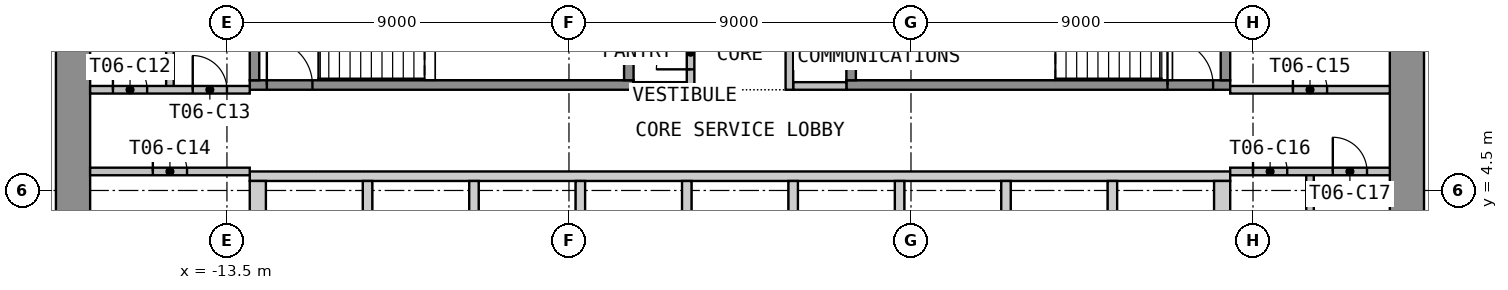
"""IFC4 building model, lengths in metres.
Left out: names, types, materials, properties, quantities, classifications, styles, units other than length and angle.
Written with IfcOpenShell. Run it as: python <this file> out.ifc"""

import sys

from ifc_helpers import new_model, si_unit, direction, frame, frame_2d, origin, place, context, subcontext, project, spatial, polyline, rectangle, outline, extrude, element, fill, save


model = new_model("IFC4")
c1 = context("Model", 3, precision=1e-05, world=origin(), true_north=direction((0.0, 1.0)))
c2 = subcontext(c1, "Body", "Model", "MODEL_VIEW")
j1 = project(units=[si_unit("LENGTHUNIT", "METRE"), si_unit("PLANEANGLEUNIT", "RADIAN")], contexts=[c1])
p1 = place(None, origin())
s1 = spatial("IfcSite", under=j1, at=p1, CompositionType="ELEMENT")
p2 = place(p1, origin())
s2 = spatial("IfcBuilding", under=s1, at=p2, CompositionType="ELEMENT")
p3 = place(p2, frame((0.0, 0.0, 93.0)))
s3 = spatial("IfcBuildingStorey", under=s2, at=p3, CompositionType="ELEMENT", Elevation=93.0)
p4 = place(p3, frame((-17.55, -12.6, 0.0), z_axis=(0.0, 0.0, 1.0), x_axis=(0.0, 1.0, 0.0)))
e1 = element("IfcWall", 1, at=p4, inside=s3, PredefinedType="SHEAR", context=c2, shape_type="SweptSolid", body=[
    extrude(rectangle(XDim=25.2, YDim=0.9, at=frame_2d((12.6, 0.0))), origin(), (0.0, 0.0, 1.0), 3.525),
])
p5 = place(p4, frame((11.4, 0.0, 0.0)))
e2 = element("IfcOpeningElement", 2, at=p5, cuts=e1, PredefinedType="OPENING", context=c2, shape_type="SweptSolid", body=[
    extrude(rectangle(XDim=2.4, YDim=2.1, at=frame_2d((1.2, 1.05))), frame((0.0, 0.46, 0.0), z_axis=(0.0, -1.0, 0.0), x_axis=(1.0, 0.0, 0.0)), (0.0, 0.0, 1.0), 0.92),
])
p6 = place(p3, frame((17.55, -12.6, 0.0), z_axis=(0.0, 0.0, 1.0), x_axis=(0.0, 1.0, 0.0)))
e3 = element("IfcWall", 3, at=p6, inside=s3, PredefinedType="SHEAR", context=c2, shape_type="SweptSolid", body=[
    extrude(rectangle(XDim=25.2, YDim=0.9, at=frame_2d((12.6, 0.0))), origin(), (0.0, 0.0, 1.0), 3.525),
])
p7 = place(p6, frame((11.4, 0.0, 0.0)))
e4 = element("IfcOpeningElement", 4, at=p7, cuts=e3, PredefinedType="OPENING", context=c2, shape_type="SweptSolid", body=[
    extrude(rectangle(XDim=2.4, YDim=2.1, at=frame_2d((1.2, 1.05))), frame((0.0, 0.46, 0.0), z_axis=(0.0, -1.0, 0.0), x_axis=(1.0, 0.0, 0.0)), (0.0, 0.0, 1.0), 0.92),
])
p8 = place(p3, origin())
e5 = element("IfcWall", 5, at=p8, inside=s3, PredefinedType="SHEAR", context=c2, shape_type="SweptSolid", body=[
    extrude(outline(polyline([(-12.9, 4.75), (12.9, 4.75), (12.9, 5.0), (-12.9, 5.0), (-12.9, 4.75)])), origin(), (0.0, 0.0, 1.0), 3.525),
])
p9 = place(p3, origin())
e6 = element("IfcWall", 6, at=p9, inside=s3, PredefinedType="SHEAR", context=c2, shape_type="SweptSolid", body=[
    extrude(outline(polyline([(-12.9, 2.05), (-12.475, 2.05), (-12.475, 4.75), (-12.9, 4.75), (-12.9, 2.05)])), origin(), (0.0, 0.0, 1.0), 3.525),
])
p10 = place(p3, origin())
e7 = element("IfcWall", 7, at=p10, inside=s3, PredefinedType="SHEAR", context=c2, shape_type="SweptSolid", body=[
    extrude(outline(polyline([(-9.925, 2.05), (-9.675, 2.05), (-9.675, 4.75), (-9.925, 4.75), (-9.925, 2.05)])), origin(), (0.0, 0.0, 1.0), 3.525),
])
p11 = place(p3, origin())
e8 = element("IfcWall", 8, at=p11, inside=s3, PredefinedType="SHEAR", context=c2, shape_type="SweptSolid", body=[
    extrude(outline(polyline([(-7.125, 2.05), (-6.875, 2.05), (-6.875, 4.75), (-7.125, 4.75), (-7.125, 2.05)])), origin(), (0.0, 0.0, 1.0), 3.525),
])
p12 = place(p3, origin())
e9 = element("IfcWall", 9, at=p12, inside=s3, PredefinedType="SHEAR", context=c2, shape_type="SweptSolid", body=[
    extrude(outline(polyline([(-4.325, 2.05), (-4.075, 2.05), (-4.075, 4.75), (-4.325, 4.75), (-4.325, 2.05)])), origin(), (0.0, 0.0, 1.0), 3.525),
])
p13 = place(p3, origin())
e10 = element("IfcWall", 10, at=p13, inside=s3, PredefinedType="SHEAR", context=c2, shape_type="SweptSolid", body=[
    extrude(outline(polyline([(-1.525, 2.05), (-1.275, 2.05), (-1.275, 4.75), (-1.525, 4.75), (-1.525, 2.05)])), origin(), (0.0, 0.0, 1.0), 3.525),
])
p14 = place(p3, origin())
e11 = element("IfcWall", 11, at=p14, inside=s3, PredefinedType="SHEAR", context=c2, shape_type="SweptSolid", body=[
    extrude(outline(polyline([(1.275, 2.05), (1.525, 2.05), (1.525, 4.75), (1.275, 4.75), (1.275, 2.05)])), origin(), (0.0, 0.0, 1.0), 3.525),
])
p15 = place(p3, origin())
e12 = element("IfcWall", 12, at=p15, inside=s3, PredefinedType="SHEAR", context=c2, shape_type="SweptSolid", body=[
    extrude(outline(polyline([(4.075, 2.05), (4.325, 2.05), (4.325, 4.75), (4.075, 4.75), (4.075, 2.05)])), origin(), (0.0, 0.0, 1.0), 3.525),
])
p16 = place(p3, origin())
e13 = element("IfcWall", 13, at=p16, inside=s3, PredefinedType="SHEAR", context=c2, shape_type="SweptSolid", body=[
    extrude(outline(polyline([(6.875, 2.05), (7.125, 2.05), (7.125, 4.75), (6.875, 4.75), (6.875, 2.05)])), origin(), (0.0, 0.0, 1.0), 3.525),
])
p17 = place(p3, origin())
e14 = element("IfcWall", 14, at=p17, inside=s3, PredefinedType="SHEAR", context=c2, shape_type="SweptSolid", body=[
    extrude(outline(polyline([(9.675, 2.05), (9.925, 2.05), (9.925, 4.75), (9.675, 4.75), (9.675, 2.05)])), origin(), (0.0, 0.0, 1.0), 3.525),
])
p18 = place(p3, origin())
e15 = element("IfcWall", 15, at=p18, inside=s3, PredefinedType="SHEAR", context=c2, shape_type="SweptSolid", body=[
    extrude(outline(polyline([(12.475, 2.05), (12.9, 2.05), (12.9, 4.75), (12.475, 4.75), (12.475, 2.05)])), origin(), (0.0, 0.0, 1.0), 3.525),
])
p19 = place(p3, frame((-12.9, 7.275, 0.0), z_axis=(0.0, 0.0, 1.0), x_axis=(1.0, 0.0, 0.0)))
e16 = element("IfcWall", 16, at=p19, inside=s3, PredefinedType="SHEAR", context=c2, shape_type="SweptSolid", body=[
    extrude(rectangle(XDim=10.1, YDim=0.25, at=frame_2d((5.05, 0.0))), origin(), (0.0, 0.0, 1.0), 3.525),
])
p20 = place(p19, frame((0.45, 0.0, 0.0)))
e17 = element("IfcOpeningElement", 17, at=p20, cuts=e16, PredefinedType="OPENING", context=c2, shape_type="SweptSolid", body=[
    extrude(rectangle(XDim=1.2, YDim=2.1, at=frame_2d((0.6, 1.05))), frame((0.0, 0.135, 0.0), z_axis=(0.0, -1.0, 0.0), x_axis=(1.0, 0.0, 0.0)), (0.0, 0.0, 1.0), 0.27),
])
for number, where, z_axis, x_axis in (
    (18, (-12.775, 7.4, 0.0), (0.0, 0.0, 1.0), (0.0, 1.0, 0.0)),
    (19, (-2.925, 7.4, 0.0), (0.0, 0.0, 1.0), (0.0, 1.0, 0.0)),
):
    element("IfcWall", number, at=place(p3, frame(where, z_axis=z_axis, x_axis=x_axis)), inside=s3, PredefinedType="SHEAR", context=c2, shape_type="SweptSolid", body=[
        extrude(rectangle(XDim=3.25, YDim=0.25, at=frame_2d((1.625, 0.0))), origin(), (0.0, 0.0, 1.0), 3.525),
    ])
p21 = place(p3, frame((2.8, 7.275, 0.0), z_axis=(0.0, 0.0, 1.0), x_axis=(1.0, 0.0, 0.0)))
e20 = element("IfcWall", 20, at=p21, inside=s3, PredefinedType="SHEAR", context=c2, shape_type="SweptSolid", body=[
    extrude(rectangle(XDim=10.1, YDim=0.25, at=frame_2d((5.05, 0.0))), origin(), (0.0, 0.0, 1.0), 3.525),
])
p22 = place(p21, frame((8.45, 0.0, 0.0)))
e21 = element("IfcOpeningElement", 21, at=p22, cuts=e20, PredefinedType="OPENING", context=c2, shape_type="SweptSolid", body=[
    extrude(rectangle(XDim=1.2, YDim=2.1, at=frame_2d((0.6, 1.05))), frame((0.0, 0.135, 0.0), z_axis=(0.0, -1.0, 0.0), x_axis=(1.0, 0.0, 0.0)), (0.0, 0.0, 1.0), 0.27),
])
for number, where, z_axis, x_axis in (
    (22, (2.925, 7.4, 0.0), (0.0, 0.0, 1.0), (0.0, 1.0, 0.0)),
    (23, (12.775, 7.4, 0.0), (0.0, 0.0, 1.0), (0.0, 1.0, 0.0)),
):
    element("IfcWall", number, at=place(p3, frame(where, z_axis=z_axis, x_axis=x_axis)), inside=s3, PredefinedType="SHEAR", context=c2, shape_type="SweptSolid", body=[
        extrude(rectangle(XDim=3.25, YDim=0.25, at=frame_2d((1.625, 0.0))), origin(), (0.0, 0.0, 1.0), 3.525),
    ])
for number, where, z_axis, x_axis in (
    (24, (-2.8, 7.25, 0.0), (0.0, 0.0, 1.0), (1.0, 0.0, 0.0)),
    (25, (1.4, 7.25, 0.0), (0.0, 0.0, 1.0), (1.0, 0.0, 0.0)),
):
    element("IfcWall", number, at=place(p3, frame(where, z_axis=z_axis, x_axis=x_axis)), inside=s3, PredefinedType="PARTITIONING", context=c2, shape_type="SweptSolid", body=[
        extrude(rectangle(XDim=1.4, YDim=0.2, at=frame_2d((0.7, 0.0))), origin(), (0.0, 0.0, 1.0), 3.525),
    ])
p23 = place(p3, frame((-1.3, 7.15, 0.0), z_axis=(0.0, 0.0, 1.0), x_axis=(0.0, 1.0, 0.0)))
e26 = element("IfcWall", 26, at=p23, inside=s3, PredefinedType="PARTITIONING", context=c2, shape_type="SweptSolid", body=[
    extrude(rectangle(XDim=5.45, YDim=0.2, at=frame_2d((2.725, 0.0))), origin(), (0.0, 0.0, 1.0), 3.525),
])
p24 = place(p23, frame((0.538, 0.0, 0.0)))
e27 = element("IfcOpeningElement", 27, at=p24, cuts=e26, PredefinedType="OPENING", context=c2, shape_type="SweptSolid", body=[
    extrude(rectangle(XDim=0.9, YDim=2.1, at=frame_2d((0.45, 1.05))), frame((0.0, 0.11, 0.0), z_axis=(0.0, -1.0, 0.0), x_axis=(1.0, 0.0, 0.0)), (0.0, 0.0, 1.0), 0.22),
])
p25 = place(p23, frame((3.163, 0.0, 0.0)))
e28 = element("IfcOpeningElement", 28, at=p25, cuts=e26, PredefinedType="OPENING", context=c2, shape_type="SweptSolid", body=[
    extrude(rectangle(XDim=0.9, YDim=2.1, at=frame_2d((0.45, 1.05))), frame((0.0, 0.11, 0.0), z_axis=(0.0, -1.0, 0.0), x_axis=(1.0, 0.0, 0.0)), (0.0, 0.0, 1.0), 0.22),
])
p26 = place(p3, frame((1.3, 7.15, 0.0), z_axis=(0.0, 0.0, 1.0), x_axis=(0.0, 1.0, 0.0)))
e29 = element("IfcWall", 29, at=p26, inside=s3, PredefinedType="PARTITIONING", context=c2, shape_type="SweptSolid", body=[
    extrude(rectangle(XDim=5.45, YDim=0.2, at=frame_2d((2.725, 0.0))), origin(), (0.0, 0.0, 1.0), 3.525),
])
p27 = place(p26, frame((1.587, 0.0, 0.0)))
e30 = element("IfcOpeningElement", 30, at=p27, cuts=e29, PredefinedType="OPENING", context=c2, shape_type="SweptSolid", body=[
    extrude(rectangle(XDim=0.9, YDim=2.1, at=frame_2d((0.45, 1.05))), frame((0.0, 0.11, 0.0), z_axis=(0.0, -1.0, 0.0), x_axis=(1.0, 0.0, 0.0)), (0.0, 0.0, 1.0), 0.22),
])
p28 = place(p26, frame((4.212, 0.0, 0.0)))
e31 = element("IfcOpeningElement", 31, at=p28, cuts=e29, PredefinedType="OPENING", context=c2, shape_type="SweptSolid", body=[
    extrude(rectangle(XDim=0.9, YDim=2.1, at=frame_2d((0.45, 1.05))), frame((0.0, 0.11, 0.0), z_axis=(0.0, -1.0, 0.0), x_axis=(1.0, 0.0, 0.0)), (0.0, 0.0, 1.0), 0.22),
])
p29 = place(p3, frame((-15.0, 7.15, 0.0), z_axis=(0.0, 0.0, 1.0), x_axis=(0.0, 1.0, 0.0)))
e32 = element("IfcWall", 32, at=p29, inside=s3, PredefinedType="PARTITIONING", context=c2, shape_type="SweptSolid", body=[
    extrude(rectangle(XDim=5.45, YDim=0.2, at=frame_2d((2.725, 0.0))), origin(), (0.0, 0.0, 1.0), 3.525),
])
p30 = place(p3, frame((-17.1, 7.15, 0.0), z_axis=(0.0, 0.0, 1.0), x_axis=(1.0, 0.0, 0.0)))
e33 = element("IfcWall", 33, at=p30, inside=s3, PredefinedType="PARTITIONING", context=c2, shape_type="SweptSolid", body=[
    extrude(rectangle(XDim=4.2, YDim=0.2, at=frame_2d((2.1, 0.0))), origin(), (0.0, 0.0, 1.0), 3.525),
])
p31 = place(p30, frame((0.6, 0.0, 0.0)))
e34 = element("IfcOpeningElement", 34, at=p31, cuts=e33, PredefinedType="OPENING", context=c2, shape_type="SweptSolid", body=[
    extrude(rectangle(XDim=0.9, YDim=2.1, at=frame_2d((0.45, 1.05))), frame((0.0, 0.11, 0.0), z_axis=(0.0, -1.0, 0.0), x_axis=(1.0, 0.0, 0.0)), (0.0, 0.0, 1.0), 0.22),
])
p32 = place(p30, frame((2.7, 0.0, 0.0)))
e35 = element("IfcOpeningElement", 35, at=p32, cuts=e33, PredefinedType="OPENING", context=c2, shape_type="SweptSolid", body=[
    extrude(rectangle(XDim=0.9, YDim=2.1, at=frame_2d((0.45, 1.05))), frame((0.0, 0.11, 0.0), z_axis=(0.0, -1.0, 0.0), x_axis=(1.0, 0.0, 0.0)), (0.0, 0.0, 1.0), 0.22),
])
p33 = place(p3, frame((-17.1, 5.0, 0.0), z_axis=(0.0, 0.0, 1.0), x_axis=(1.0, 0.0, 0.0)))
e36 = element("IfcWall", 36, at=p33, inside=s3, PredefinedType="PARTITIONING", context=c2, shape_type="SweptSolid", body=[
    extrude(rectangle(XDim=4.2, YDim=0.2, at=frame_2d((2.1, 0.0))), origin(), (0.0, 0.0, 1.0), 3.525),
])
p34 = place(p33, frame((1.65, 0.0, 0.0)))
e37 = element("IfcOpeningElement", 37, at=p34, cuts=e36, PredefinedType="OPENING", context=c2, shape_type="SweptSolid", body=[
    extrude(rectangle(XDim=0.9, YDim=2.1, at=frame_2d((0.45, 1.05))), frame((0.0, 0.11, 0.0), z_axis=(0.0, -1.0, 0.0), x_axis=(1.0, 0.0, 0.0)), (0.0, 0.0, 1.0), 0.22),
])
p35 = place(p3, frame((12.9, 7.15, 0.0), z_axis=(0.0, 0.0, 1.0), x_axis=(1.0, 0.0, 0.0)))
e38 = element("IfcWall", 38, at=p35, inside=s3, PredefinedType="PARTITIONING", context=c2, shape_type="SweptSolid", body=[
    extrude(rectangle(XDim=4.2, YDim=0.2, at=frame_2d((2.1, 0.0))), origin(), (0.0, 0.0, 1.0), 3.525),
])
p36 = place(p35, frame((1.65, 0.0, 0.0)))
e39 = element("IfcOpeningElement", 39, at=p36, cuts=e38, PredefinedType="OPENING", context=c2, shape_type="SweptSolid", body=[
    extrude(rectangle(XDim=0.9, YDim=2.1, at=frame_2d((0.45, 1.05))), frame((0.0, 0.11, 0.0), z_axis=(0.0, -1.0, 0.0), x_axis=(1.0, 0.0, 0.0)), (0.0, 0.0, 1.0), 0.22),
])
p37 = place(p3, frame((15.0, 1.8, 0.0), z_axis=(0.0, 0.0, 1.0), x_axis=(0.0, 1.0, 0.0)))
e40 = element("IfcWall", 40, at=p37, inside=s3, PredefinedType="PARTITIONING", context=c2, shape_type="SweptSolid", body=[
    extrude(rectangle(XDim=3.2, YDim=0.2, at=frame_2d((1.6, 0.0))), origin(), (0.0, 0.0, 1.0), 3.525),
])
p38 = place(p3, frame((12.9, 5.0, 0.0), z_axis=(0.0, 0.0, 1.0), x_axis=(1.0, 0.0, 0.0)))
e41 = element("IfcWall", 41, at=p38, inside=s3, PredefinedType="PARTITIONING", context=c2, shape_type="SweptSolid", body=[
    extrude(rectangle(XDim=4.2, YDim=0.2, at=frame_2d((2.1, 0.0))), origin(), (0.0, 0.0, 1.0), 3.525),
])
p39 = place(p38, frame((0.6, 0.0, 0.0)))
e42 = element("IfcOpeningElement", 42, at=p39, cuts=e41, PredefinedType="OPENING", context=c2, shape_type="SweptSolid", body=[
    extrude(rectangle(XDim=0.9, YDim=2.1, at=frame_2d((0.45, 1.05))), frame((0.0, 0.11, 0.0), z_axis=(0.0, -1.0, 0.0), x_axis=(1.0, 0.0, 0.0)), (0.0, 0.0, 1.0), 0.22),
])
p40 = place(p38, frame((2.7, 0.0, 0.0)))
e43 = element("IfcOpeningElement", 43, at=p40, cuts=e41, PredefinedType="OPENING", context=c2, shape_type="SweptSolid", body=[
    extrude(rectangle(XDim=0.9, YDim=2.1, at=frame_2d((0.45, 1.05))), frame((0.0, 0.11, 0.0), z_axis=(0.0, -1.0, 0.0), x_axis=(1.0, 0.0, 0.0)), (0.0, 0.0, 1.0), 0.22),
])
p41 = place(p20, origin())
e44 = element("IfcDoor", 44, at=p41, inside=s3, OperationType="SINGLE_SWING_LEFT", PredefinedType="DOOR", context=c2, shape_type="SweptSolid", body=[
    extrude(rectangle(XDim=1.2, YDim=2.1, at=frame_2d((0.6, 1.05))), frame((0.0, 0.025, 0.0), z_axis=(0.0, -1.0, 0.0), x_axis=(1.0, 0.0, 0.0)), (0.0, 0.0, 1.0), 0.05),
])
fill(e17, e44)
p42 = place(p22, origin())
e45 = element("IfcDoor", 45, at=p42, inside=s3, OperationType="SINGLE_SWING_LEFT", PredefinedType="DOOR", context=c2, shape_type="SweptSolid", body=[
    extrude(rectangle(XDim=1.2, YDim=2.1, at=frame_2d((0.6, 1.05))), frame((0.0, 0.025, 0.0), z_axis=(0.0, -1.0, 0.0), x_axis=(1.0, 0.0, 0.0)), (0.0, 0.0, 1.0), 0.05),
])
fill(e21, e45)
p43 = place(p24, origin())
e46 = element("IfcDoor", 46, at=p43, inside=s3, OperationType="SINGLE_SWING_LEFT", PredefinedType="DOOR", context=c2, shape_type="SweptSolid", body=[
    extrude(rectangle(XDim=0.9, YDim=2.1, at=frame_2d((0.45, 1.05))), frame((0.0, 0.025, 0.0), z_axis=(0.0, -1.0, 0.0), x_axis=(1.0, 0.0, 0.0)), (0.0, 0.0, 1.0), 0.05),
])
fill(e27, e46)
p44 = place(p31, origin())
e47 = element("IfcDoor", 47, at=p44, inside=s3, OperationType="SINGLE_SWING_LEFT", PredefinedType="DOOR", context=c2, shape_type="SweptSolid", body=[
    extrude(rectangle(XDim=0.9, YDim=2.1, at=frame_2d((0.45, 1.05))), frame((0.0, 0.025, 0.0), z_axis=(0.0, -1.0, 0.0), x_axis=(1.0, 0.0, 0.0)), (0.0, 0.0, 1.0), 0.05),
])
fill(e34, e47)
p45 = place(p32, origin())
e48 = element("IfcDoor", 48, at=p45, inside=s3, OperationType="SINGLE_SWING_LEFT", PredefinedType="DOOR", context=c2, shape_type="SweptSolid", body=[
    extrude(rectangle(XDim=0.9, YDim=2.1, at=frame_2d((0.45, 1.05))), frame((0.0, 0.025, 0.0), z_axis=(0.0, -1.0, 0.0), x_axis=(1.0, 0.0, 0.0)), (0.0, 0.0, 1.0), 0.05),
])
fill(e35, e48)
p46 = place(p34, origin())
e49 = element("IfcDoor", 49, at=p46, inside=s3, OperationType="SINGLE_SWING_LEFT", PredefinedType="DOOR", context=c2, shape_type="SweptSolid", body=[
    extrude(rectangle(XDim=0.9, YDim=2.1, at=frame_2d((0.45, 1.05))), frame((0.0, 0.025, 0.0), z_axis=(0.0, -1.0, 0.0), x_axis=(1.0, 0.0, 0.0)), (0.0, 0.0, 1.0), 0.05),
])
fill(e37, e49)
p47 = place(p36, origin())
e50 = element("IfcDoor", 50, at=p47, inside=s3, OperationType="SINGLE_SWING_LEFT", PredefinedType="DOOR", context=c2, shape_type="SweptSolid", body=[
    extrude(rectangle(XDim=0.9, YDim=2.1, at=frame_2d((0.45, 1.05))), frame((0.0, 0.025, 0.0), z_axis=(0.0, -1.0, 0.0), x_axis=(1.0, 0.0, 0.0)), (0.0, 0.0, 1.0), 0.05),
])
fill(e39, e50)
p48 = place(p39, origin())
e51 = element("IfcDoor", 51, at=p48, inside=s3, OperationType="SINGLE_SWING_LEFT", PredefinedType="DOOR", context=c2, shape_type="SweptSolid", body=[
    extrude(rectangle(XDim=0.9, YDim=2.1, at=frame_2d((0.45, 1.05))), frame((0.0, 0.025, 0.0), z_axis=(0.0, -1.0, 0.0), x_axis=(1.0, 0.0, 0.0)), (0.0, 0.0, 1.0), 0.05),
])
fill(e42, e51)
p49 = place(p40, origin())
e52 = element("IfcDoor", 52, at=p49, inside=s3, OperationType="SINGLE_SWING_LEFT", PredefinedType="DOOR", context=c2, shape_type="SweptSolid", body=[
    extrude(rectangle(XDim=0.9, YDim=2.1, at=frame_2d((0.45, 1.05))), frame((0.0, 0.025, 0.0), z_axis=(0.0, -1.0, 0.0), x_axis=(1.0, 0.0, 0.0)), (0.0, 0.0, 1.0), 0.05),
])
fill(e43, e52)
save(model, sys.argv[1])
